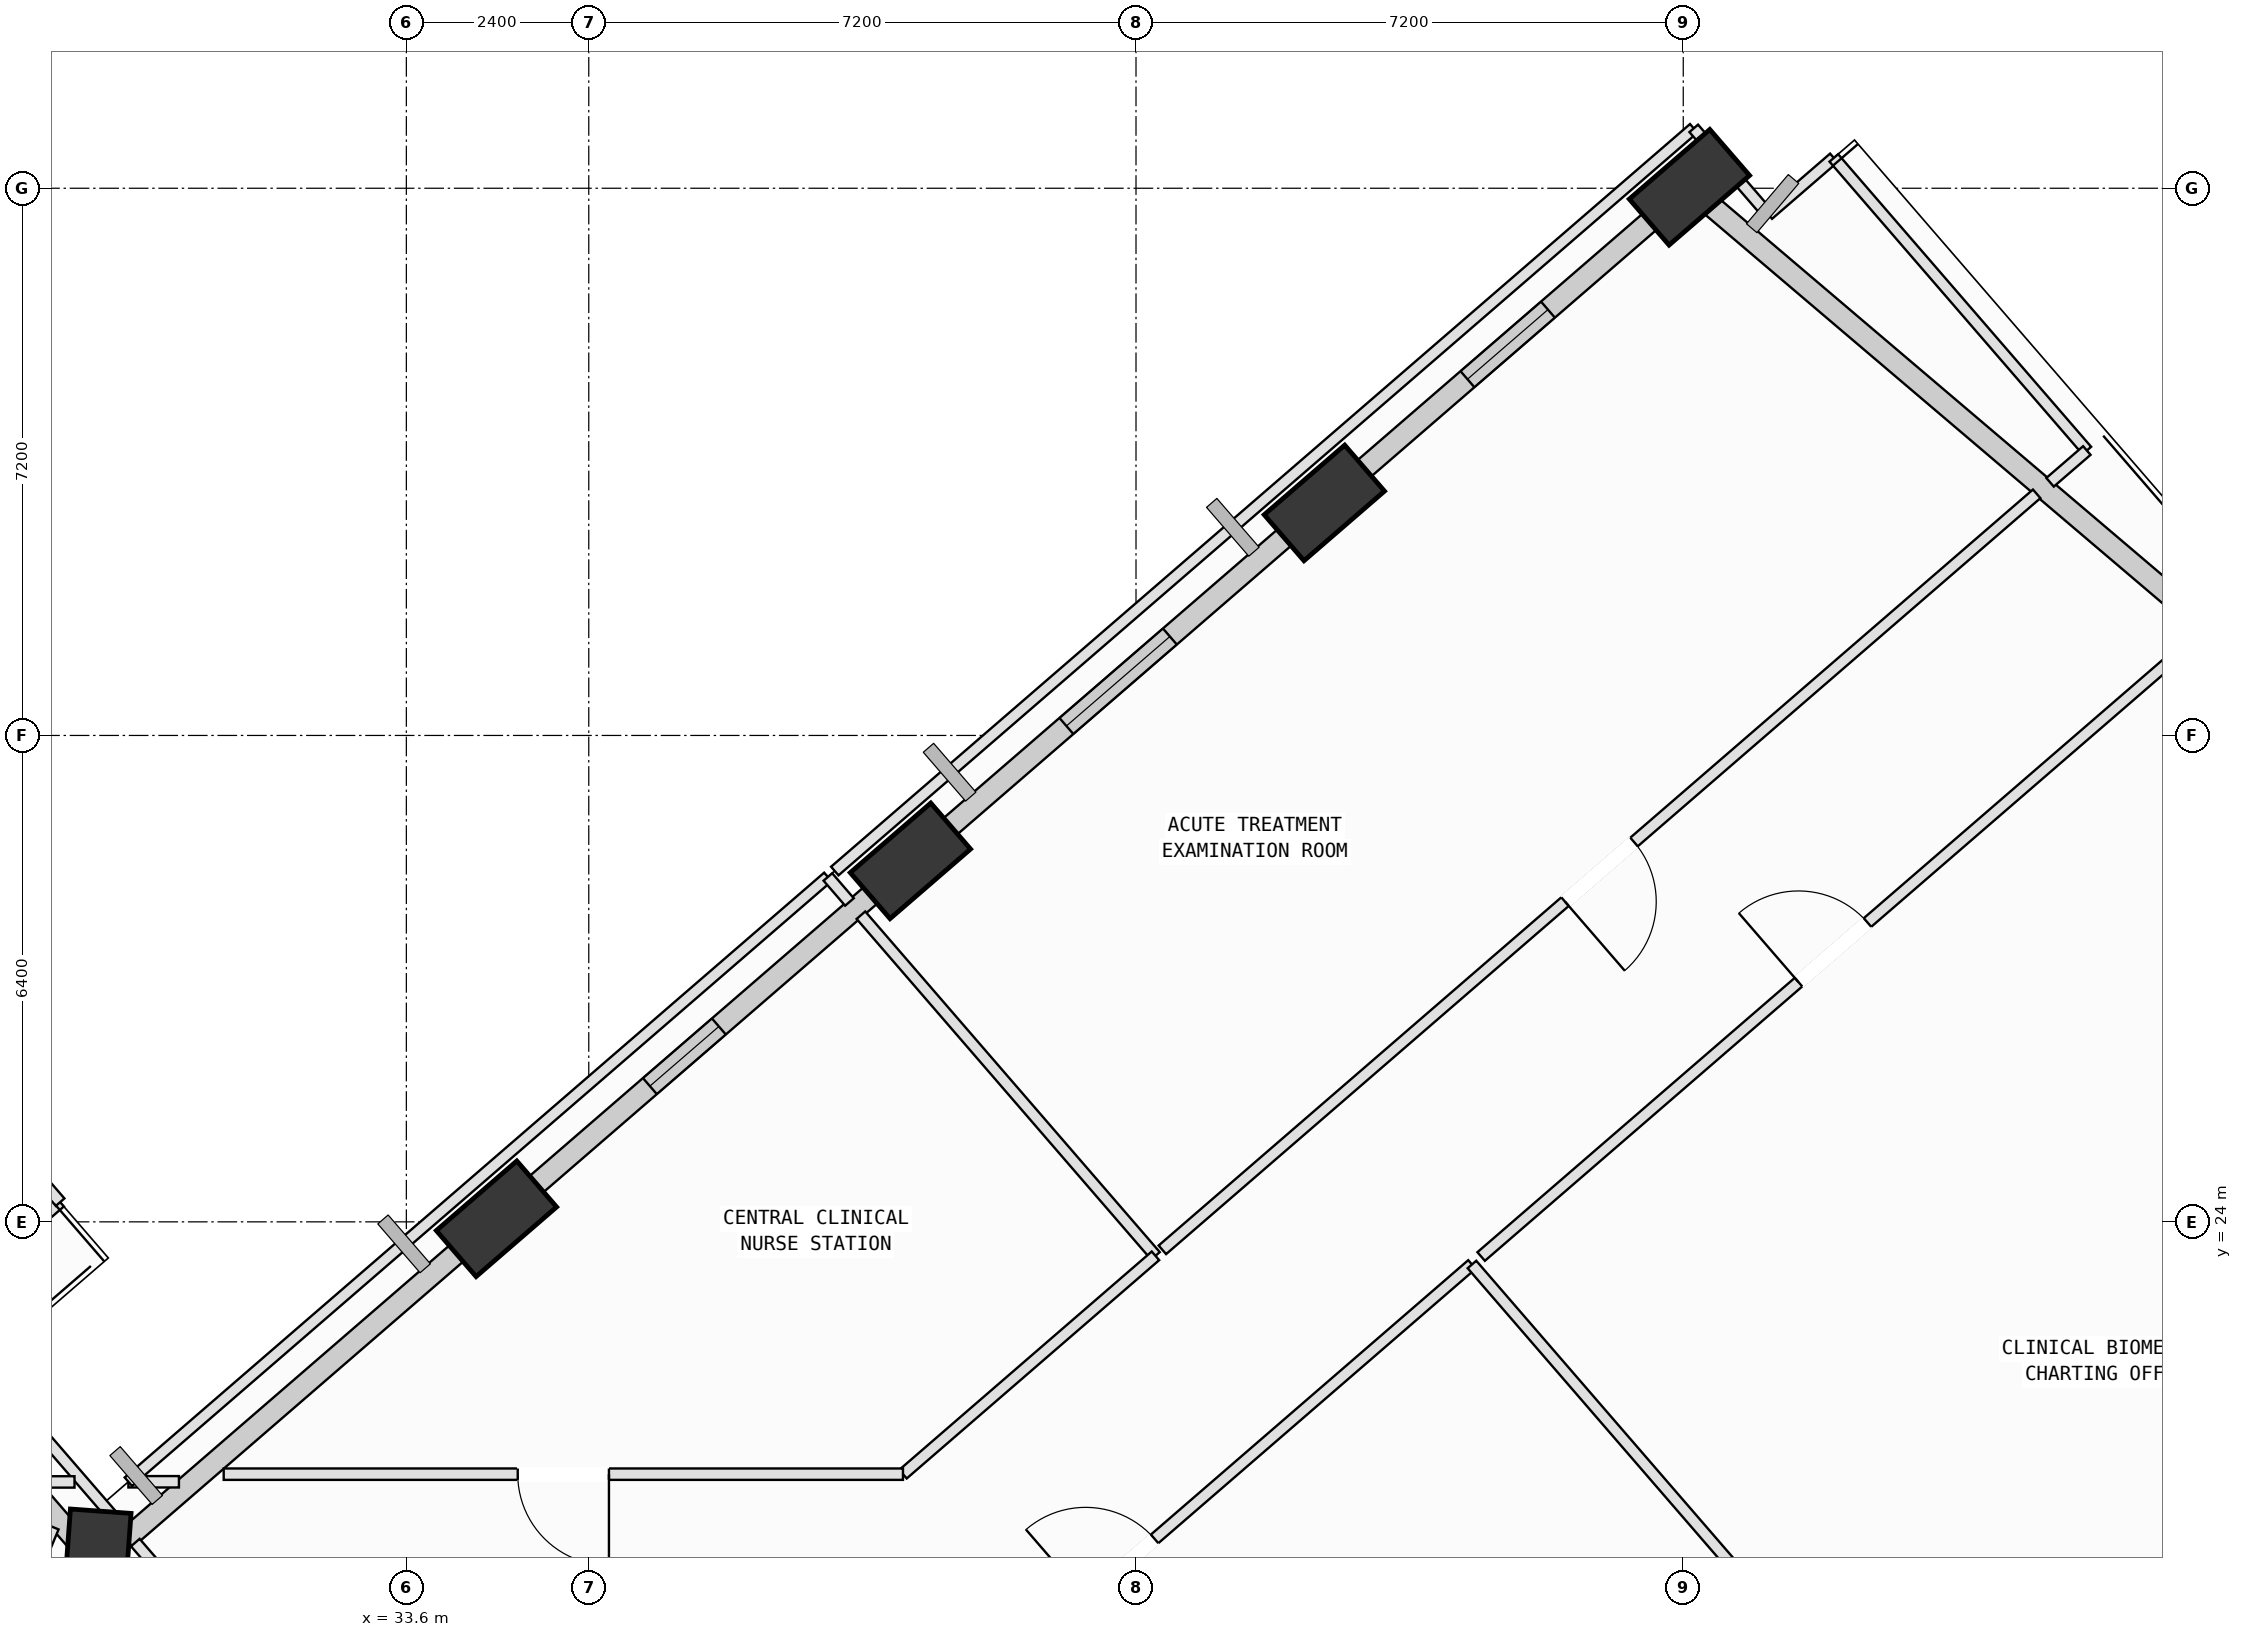
"""IFC4 building model, lengths in metres.
Left out: names, types, materials, properties, quantities, classifications, styles, units other than length and angle.
Written with IfcOpenShell. Run it as: python <this file> out.ifc"""

import sys

from ifc_helpers import new_model, si_unit, direction, frame, frame_2d, origin, origin_2d, place, context, subcontext, project, spatial, rectangle, extrude, element, fill, save


model = new_model("IFC4")
c1 = context("Model", 3, precision=1e-05, world=origin(), true_north=direction((0.0, 1.0)))
c2 = subcontext(c1, "Body", "Model", "MODEL_VIEW")
j1 = project(units=[si_unit("LENGTHUNIT", "METRE"), si_unit("PLANEANGLEUNIT", "RADIAN")], contexts=[c1])
p1 = place(None, origin())
s1 = spatial("IfcSite", under=j1, at=p1, CompositionType="ELEMENT")
p2 = place(p1, origin())
s2 = spatial("IfcBuilding", under=s1, at=p2, CompositionType="ELEMENT")
p3 = place(p2, frame((0.0, 0.0, 197.8)))
s3 = spatial("IfcBuildingStorey", under=s2, at=p3, CompositionType="ELEMENT", Elevation=197.8)
p4 = place(p3, frame((50.481, 37.613, 0.002), z_axis=(-0.053432380102, 0.069255180588, 0.996167004432), x_axis=(-0.200878399634, -0.977944004107, 0.057213576993)))
e1 = element("IfcColumn", 1, at=p4, inside=s3, PredefinedType="COLUMN", context=c2, shape_type="SweptSolid", body=[
    extrude(rectangle(XDim=1.4, YDim=0.8, at=origin_2d()), origin(), (0.0, 0.0, 1.0), 4.012),
])
p5 = place(p3, frame((45.678, 33.459, 0.002), z_axis=(-0.036219429915, 0.049695009059, 0.998107488686), x_axis=(-0.226770917877, -0.973117242433, 0.040221676789)))
e2 = element("IfcColumn", 2, at=p5, inside=s3, PredefinedType="COLUMN", context=c2, shape_type="SweptSolid", body=[
    extrude(rectangle(XDim=1.4, YDim=0.8, at=origin_2d()), origin(), (0.0, 0.0, 1.0), 4.004),
])
p6 = place(p3, frame((40.232, 28.75, 0.002), z_axis=(-0.016547249216, 0.027293802213, 0.999490488651), x_axis=(-0.307912617541, -0.951185560654, 0.02087700081)))
e3 = element("IfcColumn", 3, at=p6, inside=s3, PredefinedType="COLUMN", context=c2, shape_type="SweptSolid", body=[
    extrude(rectangle(XDim=1.4, YDim=0.8, at=origin_2d()), origin(), (0.0, 0.0, 1.0), 3.998),
])
p7 = place(p3, frame((34.786, 24.041, 0.002), z_axis=(0.003115592161, 0.004948293432, 0.999982903593), x_axis=(-0.988608351302, -0.150462285729, 0.003824697358)))
e4 = element("IfcColumn", 4, at=p7, inside=s3, PredefinedType="COLUMN", context=c2, shape_type="SweptSolid", body=[
    extrude(rectangle(XDim=1.4, YDim=0.8, at=origin_2d()), origin(), (0.0, 0.0, 1.0), 3.996),
])
p8 = place(p3, frame((29.529, 19.495, 0.002), z_axis=(0.022106472195, -0.016732523153, 0.999615589392), x_axis=(-0.751277418033, 0.659407001277, 0.027652266093)))
e5 = element("IfcColumn", 5, at=p8, inside=s3, PredefinedType="COLUMN", context=c2, shape_type="SweptSolid", body=[
    extrude(rectangle(XDim=1.4, YDim=0.8, at=origin_2d()), origin(), (0.0, 0.0, 1.0), 3.998),
])
p9 = place(p3, frame((50.728, 37.404, 0.0), z_axis=(0.0, 0.0, 1.0), x_axis=(0.761999294939, -0.647577852086, 0.0)))
e6 = element("IfcWall", 6, at=p9, inside=s3, PredefinedType="SOLIDWALL", context=c2, shape_type="SweptSolid", body=[
    extrude(rectangle(XDim=8.838, YDim=0.28, at=frame_2d((4.419, 0.0))), origin(), (0.0, 0.0, 1.0), 3.265),
])
p10 = place(p3, frame((46.05, 33.781, 0.0), z_axis=(0.0, 0.0, 1.0), x_axis=(0.756433845173, 0.654070208675, 0.0)))
e7 = element("IfcWall", 7, at=p10, inside=s3, PredefinedType="SOLIDWALL", context=c2, shape_type="SweptSolid", body=[
    extrude(rectangle(XDim=5.405, YDim=0.28, at=frame_2d((2.702, 0.0))), origin(), (0.0, 0.0, 1.0), 3.265),
])
p11 = place(p10, frame((1.998, 0.0, 0.75)))
e8 = element("IfcOpeningElement", 8, at=p11, cuts=e7, PredefinedType="OPENING", context=c2, shape_type="SweptSolid", body=[
    extrude(rectangle(XDim=1.4, YDim=1.85, at=frame_2d((0.7, 0.925))), frame((0.0, 0.15, 0.0), z_axis=(0.0, -1.0, 0.0), x_axis=(1.0, 0.0, 0.0)), (0.0, 0.0, 1.0), 0.3),
])
p12 = place(p3, frame((40.612, 29.079, 0.0), z_axis=(0.0, 0.0, 1.0), x_axis=(0.75642346897, 0.654082208589, 0.0)))
e9 = element("IfcWall", 9, at=p12, inside=s3, PredefinedType="SOLIDWALL", context=c2, shape_type="SweptSolid", body=[
    extrude(rectangle(XDim=6.226, YDim=0.28, at=frame_2d((3.113, 0.0))), origin(), (0.0, 0.0, 1.0), 3.065),
])
p13 = place(p12, frame((2.21, 0.0, 0.75)))
e10 = element("IfcOpeningElement", 10, at=p13, cuts=e9, PredefinedType="OPENING", context=c2, shape_type="SweptSolid", body=[
    extrude(rectangle(XDim=1.8, YDim=2.05, at=frame_2d((0.9, 1.025))), frame((0.0, 0.15, 0.0), z_axis=(0.0, -1.0, 0.0), x_axis=(1.0, 0.0, 0.0)), (0.0, 0.0, 1.0), 0.3),
])
p14 = place(p3, frame((35.169, 24.372, 0.0), z_axis=(0.0, 0.0, 1.0), x_axis=(0.756430449214, 0.65407413609, 0.0)))
e11 = element("IfcWall", 11, at=p14, inside=s3, PredefinedType="SOLIDWALL", context=c2, shape_type="SweptSolid", body=[
    extrude(rectangle(XDim=6.211, YDim=0.28, at=frame_2d((3.105, 0.0))), origin(), (0.0, 0.0, 1.0), 3.265),
])
p15 = place(p14, frame((2.161, 0.0, 0.75)))
e12 = element("IfcOpeningElement", 12, at=p15, cuts=e11, PredefinedType="OPENING", context=c2, shape_type="SweptSolid", body=[
    extrude(rectangle(XDim=1.2, YDim=1.75, at=frame_2d((0.6, 0.875))), frame((0.0, 0.15, 0.0), z_axis=(0.0, -1.0, 0.0), x_axis=(1.0, 0.0, 0.0)), (0.0, 0.0, 1.0), 0.3),
])
p16 = place(p3, frame((29.91, 19.825, 0.0), z_axis=(0.0, 0.0, 1.0), x_axis=(0.756415755537, 0.6540911288, 0.0)))
e13 = element("IfcWall", 13, at=p16, inside=s3, PredefinedType="SOLIDWALL", context=c2, shape_type="SweptSolid", body=[
    extrude(rectangle(XDim=5.96, YDim=0.28, at=frame_2d((2.98, 0.0))), origin(), (0.0, 0.0, 1.0), 3.065),
])
p17 = place(p3, frame((29.24, 19.829, 0.0), z_axis=(0.0, 0.0, 1.0), x_axis=(-0.654095531107, 0.756411948733, 0.0)))
e14 = element("IfcWall", 14, at=p17, inside=s3, PredefinedType="SOLIDWALL", context=c2, shape_type="SweptSolid", body=[
    extrude(rectangle(XDim=6.76, YDim=0.28, at=frame_2d((3.38, 0.0))), origin(), (0.0, 0.0, 1.0), 3.265),
])
p18 = place(p3, frame((38.362, 15.433, 0.0), z_axis=(0.0, 0.0, 1.0), x_axis=(0.756407982528, 0.654100117694, 0.0)))
e15 = element("IfcWall", 15, at=p18, inside=s3, PredefinedType="PARTITIONING", context=c2, shape_type="SweptSolid", body=[
    extrude(rectangle(XDim=12.24, YDim=0.15, at=frame_2d((6.12, 0.0))), origin(), (0.0, 0.0, 1.0), 3.78),
])
p19 = place(p18, frame((5.52, 0.0, 0.0)))
e16 = element("IfcOpeningElement", 16, at=p19, cuts=e15, PredefinedType="OPENING", context=c2, shape_type="SweptSolid", body=[
    extrude(rectangle(XDim=1.2, YDim=2.15, at=frame_2d((0.6, 1.075))), frame((0.0, 0.085, 0.0), z_axis=(0.0, -1.0, 0.0), x_axis=(1.0, 0.0, 0.0)), (0.0, 0.0, 1.0), 0.17),
])
p20 = place(p3, frame((47.62, 23.439, 0.0), z_axis=(0.0, 0.0, 1.0), x_axis=(0.654095318202, -0.756412132839, 0.0)))
e17 = element("IfcWall", 17, at=p20, inside=s3, PredefinedType="PARTITIONING", context=c2, shape_type="SweptSolid", body=[
    extrude(rectangle(XDim=11.935, YDim=0.15, at=frame_2d((5.968, 0.0))), origin(), (0.0, 0.0, 1.0), 3.78),
])
p21 = place(p3, frame((47.741, 23.544, 0.0), z_axis=(0.0, 0.0, 1.0), x_axis=(0.756471721777, 0.654026401723, 0.0)))
e18 = element("IfcWall", 18, at=p21, inside=s3, PredefinedType="PARTITIONING", context=c2, shape_type="SweptSolid", body=[
    extrude(rectangle(XDim=12.24, YDim=0.15, at=frame_2d((6.12, 0.0))), origin(), (0.0, 0.0, 1.0), 3.065),
])
p22 = place(p21, frame((5.52, 0.0, 0.0)))
e19 = element("IfcOpeningElement", 19, at=p22, cuts=e18, PredefinedType="OPENING", context=c2, shape_type="SweptSolid", body=[
    extrude(rectangle(XDim=1.2, YDim=2.15, at=frame_2d((0.6, 1.075))), frame((0.0, 0.085, 0.0), z_axis=(0.0, -1.0, 0.0), x_axis=(1.0, 0.0, 0.0)), (0.0, 0.0, 1.0), 0.17),
])
p23 = place(p3, frame((30.608, 20.58, 0.0), z_axis=(0.0, 0.0, 1.0), x_axis=(-1.0, 0.0, 0.0)))
e20 = element("IfcWall", 20, at=p23, inside=s3, PredefinedType="PARTITIONING", context=c2, shape_type="SweptSolid", body=[
    extrude(rectangle(XDim=0.665, YDim=0.15, at=frame_2d((0.333, 0.0))), origin(), (0.0, 0.0, 1.0), 3.78),
])
p24 = place(p3, frame((29.943, 20.58, 0.0), z_axis=(0.0, 0.0, 1.0), x_axis=(0.756413617827, 0.654093600921, 0.0)))
e21 = element("IfcWall", 21, at=p24, inside=s3, PredefinedType="PARTITIONING", context=c2, shape_type="SweptSolid", body=[
    extrude(rectangle(XDim=12.167, YDim=0.15, at=frame_2d((6.083, 0.0))), origin(), (0.0, 0.0, 1.0), 3.78),
])
p25 = place(p3, frame((39.146, 28.538, 0.0), z_axis=(0.0, 0.0, 1.0), x_axis=(0.653239570373, -0.757151281911, 0.0)))
e22 = element("IfcWall", 22, at=p25, inside=s3, PredefinedType="PARTITIONING", context=c2, shape_type="SweptSolid", body=[
    extrude(rectangle(XDim=0.435, YDim=0.15, at=frame_2d((0.217, 0.0))), origin(), (0.0, 0.0, 1.0), 3.78),
])
p26 = place(p3, frame((39.581, 28.035, 0.0), z_axis=(0.0, 0.0, 1.0), x_axis=(0.654029596341, -0.75646895978, 0.0)))
e23 = element("IfcWall", 23, at=p26, inside=s3, PredefinedType="PARTITIONING", context=c2, shape_type="SweptSolid", body=[
    extrude(rectangle(XDim=5.925, YDim=0.15, at=frame_2d((2.962, 0.0))), origin(), (0.0, 0.0, 1.0), 3.78),
])
p27 = place(p3, frame((43.456, 23.553, 0.0), z_axis=(0.0, 0.0, 1.0), x_axis=(-0.75636911902, -0.654145057149, 0.0)))
e24 = element("IfcWall", 24, at=p27, inside=s3, PredefinedType="PARTITIONING", context=c2, shape_type="SweptSolid", body=[
    extrude(rectangle(XDim=4.392, YDim=0.15, at=frame_2d((2.196, 0.0))), origin(), (0.0, 0.0, 1.0), 3.78),
])
p28 = place(p3, frame((40.134, 20.68, 0.0), z_axis=(0.0, 0.0, 1.0), x_axis=(-1.0, 0.0, 0.0)))
e25 = element("IfcWall", 25, at=p28, inside=s3, PredefinedType="PARTITIONING", context=c2, shape_type="SweptSolid", body=[
    extrude(rectangle(XDim=8.937, YDim=0.15, at=frame_2d((4.469, 0.0))), origin(), (0.0, 0.0, 1.0), 3.78),
])
p29 = place(p28, frame((3.868, 0.0, 0.0)))
e26 = element("IfcOpeningElement", 26, at=p29, cuts=e25, PredefinedType="OPENING", context=c2, shape_type="SweptSolid", body=[
    extrude(rectangle(XDim=1.2, YDim=2.15, at=frame_2d((0.6, 1.075))), frame((0.0, 0.085, 0.0), z_axis=(0.0, -1.0, 0.0), x_axis=(1.0, 0.0, 0.0)), (0.0, 0.0, 1.0), 0.17),
])
p30 = place(p3, frame((51.519, 37.254, 0.0), z_axis=(0.0, 0.0, 1.0), x_axis=(0.756557971083, 0.653926629211, 0.0)))
e27 = element("IfcWall", 27, at=p30, inside=s3, PredefinedType="PARTITIONING", context=c2, shape_type="SweptSolid", body=[
    extrude(rectangle(XDim=1.139, YDim=0.15, at=frame_2d((0.57, 0.0))), origin(), (0.0, 0.0, 1.0), 3.78),
])
p31 = place(p3, frame((52.381, 37.999, 0.0), z_axis=(0.0, 0.0, 1.0), x_axis=(0.654044384072, -0.756456174318, 0.0)))
e28 = element("IfcWall", 28, at=p31, inside=s3, PredefinedType="PARTITIONING", context=c2, shape_type="SweptSolid", body=[
    extrude(rectangle(XDim=5.09, YDim=0.15, at=frame_2d((2.545, 0.0))), origin(), (0.0, 0.0, 1.0), 3.78),
])
p32 = place(p3, frame((55.71, 34.149, 0.0), z_axis=(0.0, 0.0, 1.0), x_axis=(-0.756771493319, -0.653679513906, 0.0)))
e29 = element("IfcWall", 29, at=p32, inside=s3, PredefinedType="PARTITIONING", context=c2, shape_type="SweptSolid", body=[
    extrude(rectangle(XDim=0.639, YDim=0.15, at=frame_2d((0.32, 0.0))), origin(), (0.0, 0.0, 1.0), 3.78),
])
p33 = place(p3, frame((55.05, 33.579, 0.0), z_axis=(0.0, 0.0, 1.0), x_axis=(-0.756410615278, -0.654097073144, 0.0)))
e30 = element("IfcWall", 30, at=p33, inside=s3, PredefinedType="PARTITIONING", context=c2, shape_type="SweptSolid", body=[
    extrude(rectangle(XDim=15.207, YDim=0.15, at=frame_2d((7.604, 0.0))), origin(), (0.0, 0.0, 1.0), 3.78),
])
p34 = place(p33, frame((7.004, 0.0, 0.0)))
e31 = element("IfcOpeningElement", 31, at=p34, cuts=e30, PredefinedType="OPENING", context=c2, shape_type="SweptSolid", body=[
    extrude(rectangle(XDim=1.2, YDim=2.15, at=frame_2d((0.6, 1.075))), frame((0.0, 0.085, 0.0), z_axis=(0.0, -1.0, 0.0), x_axis=(1.0, 0.0, 0.0)), (0.0, 0.0, 1.0), 0.17),
])
p35 = place(p3, frame((39.237, 28.616, 0.0), z_axis=(0.0, 0.0, 1.0), x_axis=(0.756425666374, 0.654079667357, 0.0)))
e32 = element("IfcWall", 32, at=p35, inside=s3, PredefinedType="PARTITIONING", context=c2, shape_type="SweptSolid", body=[
    extrude(rectangle(XDim=14.94, YDim=0.15, at=frame_2d((7.47, 0.0))), origin(), (0.0, 0.0, 1.0), 3.065),
])
p36 = place(p3, frame((50.538, 38.388, 0.0), z_axis=(0.0, 0.0, 1.0), x_axis=(0.654217385738, -0.756306559669, 0.0)))
e33 = element("IfcWall", 33, at=p36, inside=s3, PredefinedType="PARTITIONING", context=c2, shape_type="SweptSolid", body=[
    extrude(rectangle(XDim=1.5, YDim=0.15, at=frame_2d((0.75, 0.0))), origin(), (0.0, 0.0, 1.0), 3.265),
])
p37 = place(p3, frame((27.611, 22.583, 0.0), z_axis=(0.0, 0.0, 1.0), x_axis=(0.654036787696, -0.756462742203, 0.0)))
e34 = element("IfcWall", 34, at=p37, inside=s3, PredefinedType="PARTITIONING", context=c2, shape_type="SweptSolid", body=[
    extrude(rectangle(XDim=3.475, YDim=0.15, at=frame_2d((1.738, 0.0))), origin(), (0.0, 0.0, 1.0), 3.78),
])
p38 = place(p3, frame((30.034, 19.78, 0.0), z_axis=(0.0, 0.0, 1.0), x_axis=(0.654448859081, -0.756106269547, 0.0)))
e35 = element("IfcWall", 35, at=p38, inside=s3, PredefinedType="PARTITIONING", context=c2, shape_type="SweptSolid", body=[
    extrude(rectangle(XDim=0.521, YDim=0.15, at=frame_2d((0.261, 0.0))), origin(), (0.0, 0.0, 1.0), 3.78),
])
p39 = place(p3, frame((28.739, 19.461, 0.0), z_axis=(0.0, 0.0, 1.0), x_axis=(0.383078082641, 0.923715964244, 0.0)))
e36 = element("IfcWall", 36, at=p39, inside=s3, PredefinedType="PARTITIONING", context=c2, shape_type="SweptSolid", body=[
    extrude(rectangle(XDim=0.564, YDim=0.15, at=frame_2d((0.282, 0.0))), origin(), (0.0, 0.0, 1.0), 3.78),
])
p40 = place(p3, frame((29.234, 20.578, 0.0), z_axis=(0.0, 0.0, 1.0), x_axis=(-1.0, 0.0, 0.0)))
e37 = element("IfcWall", 37, at=p40, inside=s3, PredefinedType="PARTITIONING", context=c2, shape_type="SweptSolid", body=[
    extrude(rectangle(XDim=0.491, YDim=0.15, at=frame_2d((0.246, 0.0))), origin(), (0.0, 0.0, 1.0), 3.78),
])
p41 = place(p3, frame((29.045, 24.259, 0.0), z_axis=(0.0, 0.0, 1.0), x_axis=(-0.756369471886, -0.654144649141, 0.0)))
e38 = element("IfcWall", 38, at=p41, inside=s3, PredefinedType="PARTITIONING", context=c2, shape_type="SweptSolid", body=[
    extrude(rectangle(XDim=2.591, YDim=0.15, at=frame_2d((1.296, 0.0))), origin(), (0.0, 0.0, 1.0), 3.78),
])
p42 = place(p3, frame((24.97, 28.971, 0.0), z_axis=(0.0, 0.0, 1.0), x_axis=(0.654131936112, -0.756380466537, 0.0)))
e39 = element("IfcWall", 39, at=p42, inside=s3, PredefinedType="PARTITIONING", context=c2, shape_type="SweptSolid", body=[
    extrude(rectangle(XDim=6.229, YDim=0.15, at=frame_2d((3.115, 0.0))), origin(), (0.0, 0.0, 1.0), 3.78),
])
p43 = place(p11, origin())
e40 = element("IfcWindow", 40, at=p43, inside=s3, PartitioningType="SINGLE_PANEL", PredefinedType="WINDOW", context=c2, shape_type="SweptSolid", body=[
    extrude(rectangle(XDim=1.4, YDim=1.85, at=frame_2d((0.7, 0.925))), frame((0.0, 0.03, 0.0), z_axis=(0.0, -1.0, 0.0), x_axis=(1.0, 0.0, 0.0)), (0.0, 0.0, 1.0), 0.06),
])
fill(e8, e40)
p44 = place(p13, origin())
e41 = element("IfcWindow", 41, at=p44, inside=s3, PartitioningType="SINGLE_PANEL", PredefinedType="WINDOW", context=c2, shape_type="SweptSolid", body=[
    extrude(rectangle(XDim=1.8, YDim=2.05, at=frame_2d((0.9, 1.025))), frame((0.0, 0.03, 0.0), z_axis=(0.0, -1.0, 0.0), x_axis=(1.0, 0.0, 0.0)), (0.0, 0.0, 1.0), 0.06),
])
fill(e10, e41)
p45 = place(p15, origin())
e42 = element("IfcWindow", 42, at=p45, inside=s3, PartitioningType="SINGLE_PANEL", PredefinedType="WINDOW", context=c2, shape_type="SweptSolid", body=[
    extrude(rectangle(XDim=1.2, YDim=1.75, at=frame_2d((0.6, 0.875))), frame((0.0, 0.03, 0.0), z_axis=(0.0, -1.0, 0.0), x_axis=(1.0, 0.0, 0.0)), (0.0, 0.0, 1.0), 0.06),
])
fill(e12, e42)
p46 = place(p19, origin())
e43 = element("IfcDoor", 43, at=p46, inside=s3, OperationType="SINGLE_SWING_LEFT", PredefinedType="DOOR", context=c2, shape_type="SweptSolid", body=[
    extrude(rectangle(XDim=1.2, YDim=2.15, at=frame_2d((0.6, 1.075))), frame((0.0, 0.025, 0.0), z_axis=(0.0, -1.0, 0.0), x_axis=(1.0, 0.0, 0.0)), (0.0, 0.0, 1.0), 0.05),
])
fill(e16, e43)
p47 = place(p22, origin())
e44 = element("IfcDoor", 44, at=p47, inside=s3, OperationType="SINGLE_SWING_LEFT", PredefinedType="DOOR", context=c2, shape_type="SweptSolid", body=[
    extrude(rectangle(XDim=1.2, YDim=2.15, at=frame_2d((0.6, 1.075))), frame((0.0, 0.025, 0.0), z_axis=(0.0, -1.0, 0.0), x_axis=(1.0, 0.0, 0.0)), (0.0, 0.0, 1.0), 0.05),
])
fill(e19, e44)
p48 = place(p29, origin())
e45 = element("IfcDoor", 45, at=p48, inside=s3, OperationType="SINGLE_SWING_LEFT", PredefinedType="DOOR", context=c2, shape_type="SweptSolid", body=[
    extrude(rectangle(XDim=1.2, YDim=2.15, at=frame_2d((0.6, 1.075))), frame((0.0, 0.025, 0.0), z_axis=(0.0, -1.0, 0.0), x_axis=(1.0, 0.0, 0.0)), (0.0, 0.0, 1.0), 0.05),
])
fill(e26, e45)
p49 = place(p34, origin())
e46 = element("IfcDoor", 46, at=p49, inside=s3, OperationType="SINGLE_SWING_RIGHT", PredefinedType="DOOR", context=c2, shape_type="SweptSolid", body=[
    extrude(rectangle(XDim=1.2, YDim=2.15, at=frame_2d((0.6, 1.075))), frame((0.0, 0.025, 0.0), z_axis=(0.0, -1.0, 0.0), x_axis=(1.0, 0.0, 0.0)), (0.0, 0.0, 1.0), 0.05),
])
fill(e31, e46)
save(model, sys.argv[1])
